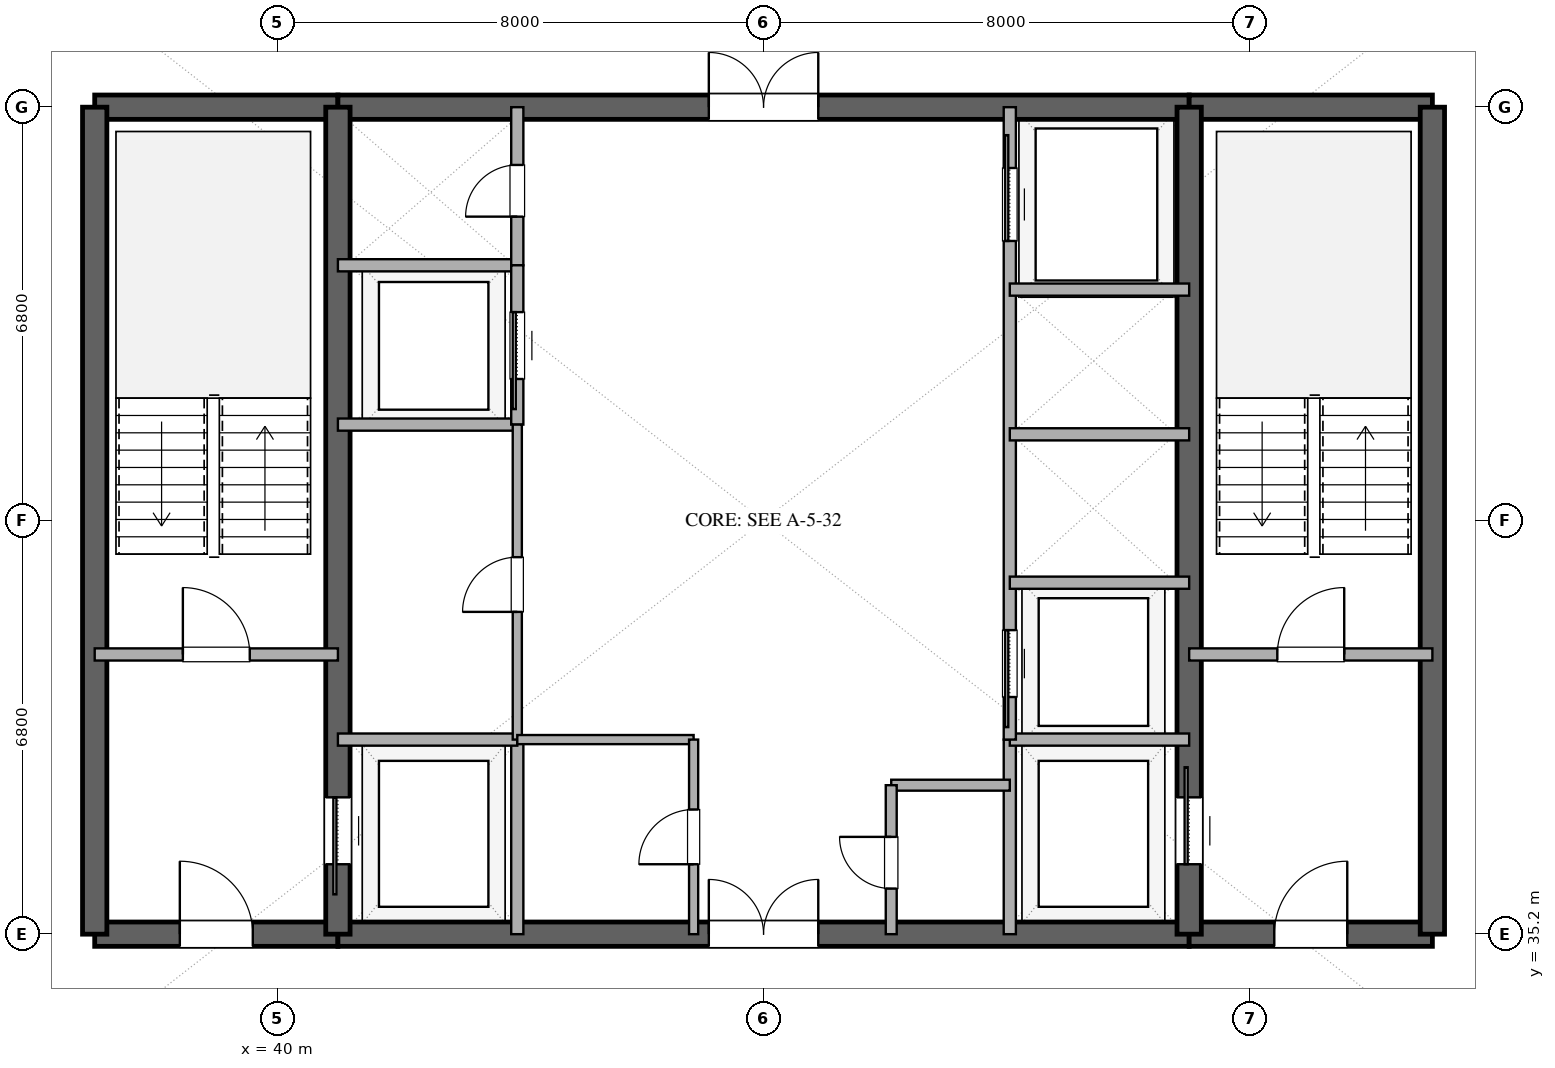
"""IFC4 building model, lengths in metres.
Left out: names, types, materials, properties, quantities, classifications, styles, units other than length and angle.
Written with IfcOpenShell. Run it as: python <this file> out.ifc"""

import sys

from ifc_helpers import new_model, si_unit, direction, frame, frame_2d, origin, place, context, subcontext, project, spatial, rectangle, extrude, element, fill, save


model = new_model("IFC4")
c1 = context("Model", 3, precision=1e-05, world=origin(), true_north=direction((0.0, 1.0)))
c2 = subcontext(c1, "Body", "Model", "MODEL_VIEW")
j1 = project(units=[si_unit("LENGTHUNIT", "METRE"), si_unit("PLANEANGLEUNIT", "RADIAN")], contexts=[c1])
p1 = place(None, origin())
s1 = spatial("IfcSite", under=j1, at=p1, CompositionType="ELEMENT")
p2 = place(p1, origin())
s2 = spatial("IfcBuilding", under=s1, at=p2, CompositionType="ELEMENT")
p3 = place(p2, frame((0.0, 0.0, 210.0)))
s3 = spatial("IfcBuildingStorey", under=s2, at=p3, CompositionType="ELEMENT", Elevation=210.0)
p4 = place(p3, frame((37.0, 35.2, 0.0), z_axis=(0.0, 0.0, 1.0), x_axis=(1.0, 0.0, 0.0)))
e1 = element("IfcWall", 1, at=p4, inside=s3, PredefinedType="SHEAR", context=c2, shape_type="SweptSolid", body=[
    extrude(rectangle(XDim=4.0, YDim=0.4, at=frame_2d((2.0, 0.0))), origin(), (0.0, 0.0, 1.0), 3.36),
])
p5 = place(p4, frame((1.4, 0.0, 0.0)))
e2 = element("IfcOpeningElement", 2, at=p5, cuts=e1, PredefinedType="OPENING", context=c2, shape_type="SweptSolid", body=[
    extrude(rectangle(XDim=1.2, YDim=2.15, at=frame_2d((0.6, 1.075))), frame((0.0, 0.21, 0.0), z_axis=(0.0, -1.0, 0.0), x_axis=(1.0, 0.0, 0.0)), (0.0, 0.0, 1.0), 0.42),
])
p6 = place(p3, frame((41.0, 35.2, 0.0), z_axis=(0.0, 0.0, 1.0), x_axis=(1.0, 0.0, 0.0)))
e3 = element("IfcWall", 3, at=p6, inside=s3, PredefinedType="SHEAR", context=c2, shape_type="SweptSolid", body=[
    extrude(rectangle(XDim=14.0, YDim=0.4, at=frame_2d((7.0, 0.0))), origin(), (0.0, 0.0, 1.0), 3.36),
])
p7 = place(p6, frame((6.1, 0.0, 0.0)))
e4 = element("IfcOpeningElement", 4, at=p7, cuts=e3, PredefinedType="OPENING", context=c2, shape_type="SweptSolid", body=[
    extrude(rectangle(XDim=1.8, YDim=2.25, at=frame_2d((0.9, 1.125))), frame((0.0, 0.21, 0.0), z_axis=(0.0, -1.0, 0.0), x_axis=(1.0, 0.0, 0.0)), (0.0, 0.0, 1.0), 0.42),
])
p8 = place(p3, frame((55.0, 35.2, 0.0), z_axis=(0.0, 0.0, 1.0), x_axis=(1.0, 0.0, 0.0)))
e5 = element("IfcWall", 5, at=p8, inside=s3, PredefinedType="SHEAR", context=c2, shape_type="SweptSolid", body=[
    extrude(rectangle(XDim=4.0, YDim=0.4, at=frame_2d((2.0, 0.0))), origin(), (0.0, 0.0, 1.0), 3.36),
])
p9 = place(p8, frame((1.4, 0.0, 0.0)))
e6 = element("IfcOpeningElement", 6, at=p9, cuts=e5, PredefinedType="OPENING", context=c2, shape_type="SweptSolid", body=[
    extrude(rectangle(XDim=1.2, YDim=2.15, at=frame_2d((0.6, 1.075))), frame((0.0, 0.21, 0.0), z_axis=(0.0, -1.0, 0.0), x_axis=(1.0, 0.0, 0.0)), (0.0, 0.0, 1.0), 0.42),
])
p10 = place(p3, frame((37.0, 48.8, 0.0), z_axis=(0.0, 0.0, 1.0), x_axis=(1.0, 0.0, 0.0)))
e7 = element("IfcWall", 7, at=p10, inside=s3, PredefinedType="SHEAR", context=c2, shape_type="SweptSolid", body=[
    extrude(rectangle(XDim=4.0, YDim=0.4, at=frame_2d((2.0, 0.0))), origin(), (0.0, 0.0, 1.0), 3.36),
])
p11 = place(p3, frame((41.0, 48.8, 0.0), z_axis=(0.0, 0.0, 1.0), x_axis=(1.0, 0.0, 0.0)))
e8 = element("IfcWall", 8, at=p11, inside=s3, PredefinedType="SHEAR", context=c2, shape_type="SweptSolid", body=[
    extrude(rectangle(XDim=14.0, YDim=0.4, at=frame_2d((7.0, 0.0))), origin(), (0.0, 0.0, 1.0), 3.36),
])
p12 = place(p11, frame((6.1, 0.0, 0.0)))
e9 = element("IfcOpeningElement", 9, at=p12, cuts=e8, PredefinedType="OPENING", context=c2, shape_type="SweptSolid", body=[
    extrude(rectangle(XDim=1.8, YDim=2.25, at=frame_2d((0.9, 1.125))), frame((0.0, 0.21, 0.0), z_axis=(0.0, -1.0, 0.0), x_axis=(1.0, 0.0, 0.0)), (0.0, 0.0, 1.0), 0.42),
])
p13 = place(p3, frame((55.0, 48.8, 0.0), z_axis=(0.0, 0.0, 1.0), x_axis=(1.0, 0.0, 0.0)))
e10 = element("IfcWall", 10, at=p13, inside=s3, PredefinedType="SHEAR", context=c2, shape_type="SweptSolid", body=[
    extrude(rectangle(XDim=4.0, YDim=0.4, at=frame_2d((2.0, 0.0))), origin(), (0.0, 0.0, 1.0), 3.36),
])
for number, where, z_axis, x_axis in (
    (11, (37.0, 35.2, 0.0), (0.0, 0.0, 1.0), (0.0, 1.0, 0.0)),
    (12, (59.0, 35.2, 0.0), (0.0, 0.0, 1.0), (0.0, 1.0, 0.0)),
):
    element("IfcWall", number, at=place(p3, frame(where, z_axis=z_axis, x_axis=x_axis)), inside=s3, PredefinedType="SHEAR", context=c2, shape_type="SweptSolid", body=[
        extrude(rectangle(XDim=13.6, YDim=0.4, at=frame_2d((6.8, 0.0))), origin(), (0.0, 0.0, 1.0), 3.36),
    ])
p14 = place(p3, frame((41.0, 35.2, 0.0), z_axis=(0.0, 0.0, 1.0), x_axis=(0.0, 1.0, 0.0)))
e13 = element("IfcWall", 13, at=p14, inside=s3, PredefinedType="SHEAR", context=c2, shape_type="SweptSolid", body=[
    extrude(rectangle(XDim=13.6, YDim=0.4, at=frame_2d((6.8, 0.0))), origin(), (0.0, 0.0, 1.0), 3.36),
])
p15 = place(p14, frame((1.15, 0.0, 0.0)))
e14 = element("IfcOpeningElement", 14, at=p15, cuts=e13, PredefinedType="OPENING", context=c2, shape_type="SweptSolid", body=[
    extrude(rectangle(XDim=1.1, YDim=2.2, at=frame_2d((0.55, 1.1))), frame((0.0, 0.21, 0.0), z_axis=(0.0, -1.0, 0.0), x_axis=(1.0, 0.0, 0.0)), (0.0, 0.0, 1.0), 0.42),
])
p16 = place(p3, frame((55.0, 35.2, 0.0), z_axis=(0.0, 0.0, 1.0), x_axis=(0.0, 1.0, 0.0)))
e15 = element("IfcWall", 15, at=p16, inside=s3, PredefinedType="SHEAR", context=c2, shape_type="SweptSolid", body=[
    extrude(rectangle(XDim=13.6, YDim=0.4, at=frame_2d((6.8, 0.0))), origin(), (0.0, 0.0, 1.0), 3.36),
])
p17 = place(p16, frame((1.15, 0.0, 0.0)))
e16 = element("IfcOpeningElement", 16, at=p17, cuts=e15, PredefinedType="OPENING", context=c2, shape_type="SweptSolid", body=[
    extrude(rectangle(XDim=1.1, YDim=2.2, at=frame_2d((0.55, 1.1))), frame((0.0, 0.21, 0.0), z_axis=(0.0, -1.0, 0.0), x_axis=(1.0, 0.0, 0.0)), (0.0, 0.0, 1.0), 0.42),
])
p18 = place(p3, frame((37.0, 39.8, 0.0), z_axis=(0.0, 0.0, 1.0), x_axis=(1.0, 0.0, 0.0)))
e17 = element("IfcWall", 17, at=p18, inside=s3, PredefinedType="SOLIDWALL", context=c2, shape_type="SweptSolid", body=[
    extrude(rectangle(XDim=4.0, YDim=0.2, at=frame_2d((2.0, 0.0))), origin(), (0.0, 0.0, 1.0), 2.72),
])
p19 = place(p18, frame((1.45, 0.0, 0.0)))
e18 = element("IfcOpeningElement", 18, at=p19, cuts=e17, PredefinedType="OPENING", context=c2, shape_type="SweptSolid", body=[
    extrude(rectangle(XDim=1.1, YDim=2.15, at=frame_2d((0.55, 1.075))), frame((0.0, 0.11, 0.0), z_axis=(0.0, -1.0, 0.0), x_axis=(1.0, 0.0, 0.0)), (0.0, 0.0, 1.0), 0.22),
])
p20 = place(p3, frame((55.0, 39.8, 0.0), z_axis=(0.0, 0.0, 1.0), x_axis=(1.0, 0.0, 0.0)))
e19 = element("IfcWall", 19, at=p20, inside=s3, PredefinedType="SOLIDWALL", context=c2, shape_type="SweptSolid", body=[
    extrude(rectangle(XDim=4.0, YDim=0.2, at=frame_2d((2.0, 0.0))), origin(), (0.0, 0.0, 1.0), 2.72),
])
p21 = place(p20, frame((1.45, 0.0, 0.0)))
e20 = element("IfcOpeningElement", 20, at=p21, cuts=e19, PredefinedType="OPENING", context=c2, shape_type="SweptSolid", body=[
    extrude(rectangle(XDim=1.1, YDim=2.15, at=frame_2d((0.55, 1.075))), frame((0.0, 0.11, 0.0), z_axis=(0.0, -1.0, 0.0), x_axis=(1.0, 0.0, 0.0)), (0.0, 0.0, 1.0), 0.22),
])
p22 = place(p3, frame((43.95, 35.2, 0.0), z_axis=(0.0, 0.0, 1.0), x_axis=(0.0, 1.0, 0.0)))
e21 = element("IfcWall", 21, at=p22, inside=s3, PredefinedType="SOLIDWALL", context=c2, shape_type="SweptSolid", body=[
    extrude(rectangle(XDim=3.2, YDim=0.2, at=frame_2d((1.6, 0.0))), origin(), (0.0, 0.0, 1.0), 2.72),
])
p23 = place(p3, frame((41.0, 38.4, 0.0), z_axis=(0.0, 0.0, 1.0), x_axis=(1.0, 0.0, 0.0)))
e22 = element("IfcWall", 22, at=p23, inside=s3, PredefinedType="SOLIDWALL", context=c2, shape_type="SweptSolid", body=[
    extrude(rectangle(XDim=2.95, YDim=0.2, at=frame_2d((1.475, 0.0))), origin(), (0.0, 0.0, 1.0), 2.72),
])
p24 = place(p3, frame((52.05, 35.2, 0.0), z_axis=(0.0, 0.0, 1.0), x_axis=(0.0, 1.0, 0.0)))
e23 = element("IfcWall", 23, at=p24, inside=s3, PredefinedType="SOLIDWALL", context=c2, shape_type="SweptSolid", body=[
    extrude(rectangle(XDim=3.2, YDim=0.2, at=frame_2d((1.6, 0.0))), origin(), (0.0, 0.0, 1.0), 2.72),
])
for number, where, z_axis, x_axis in (
    (24, (52.05, 38.4, 0.0), (0.0, 0.0, 1.0), (1.0, 0.0, 0.0)),
    (25, (41.0, 46.2, 0.0), (0.0, 0.0, 1.0), (1.0, 0.0, 0.0)),
):
    element("IfcWall", number, at=place(p3, frame(where, z_axis=z_axis, x_axis=x_axis)), inside=s3, PredefinedType="SOLIDWALL", context=c2, shape_type="SweptSolid", body=[
        extrude(rectangle(XDim=2.95, YDim=0.2, at=frame_2d((1.475, 0.0))), origin(), (0.0, 0.0, 1.0), 2.72),
    ])
p25 = place(p3, frame((43.95, 46.2, 0.0), z_axis=(0.0, 0.0, 1.0), x_axis=(0.0, 1.0, 0.0)))
e26 = element("IfcWall", 26, at=p25, inside=s3, PredefinedType="SOLIDWALL", context=c2, shape_type="SweptSolid", body=[
    extrude(rectangle(XDim=2.6, YDim=0.2, at=frame_2d((1.3, 0.0))), origin(), (0.0, 0.0, 1.0), 2.72),
])
p26 = place(p25, frame((0.8, 0.0, 0.0)))
e27 = element("IfcOpeningElement", 27, at=p26, cuts=e26, PredefinedType="OPENING", context=c2, shape_type="SweptSolid", body=[
    extrude(rectangle(XDim=0.85, YDim=2.15, at=frame_2d((0.425, 1.075))), frame((0.0, 0.11, 0.0), z_axis=(0.0, -1.0, 0.0), x_axis=(1.0, 0.0, 0.0)), (0.0, 0.0, 1.0), 0.22),
])
p27 = place(p3, frame((41.0, 43.58, 0.0), z_axis=(0.0, 0.0, 1.0), x_axis=(1.0, 0.0, 0.0)))
e28 = element("IfcWall", 28, at=p27, inside=s3, PredefinedType="SOLIDWALL", context=c2, shape_type="SweptSolid", body=[
    extrude(rectangle(XDim=2.95, YDim=0.2, at=frame_2d((1.475, 0.0))), origin(), (0.0, 0.0, 1.0), 2.72),
])
p28 = place(p3, frame((43.95, 43.58, 0.0), z_axis=(0.0, 0.0, 1.0), x_axis=(0.0, 1.0, 0.0)))
e29 = element("IfcWall", 29, at=p28, inside=s3, PredefinedType="SOLIDWALL", context=c2, shape_type="SweptSolid", body=[
    extrude(rectangle(XDim=2.62, YDim=0.2, at=frame_2d((1.31, 0.0))), origin(), (0.0, 0.0, 1.0), 2.72),
])
p29 = place(p28, frame((0.75, 0.0, 0.0)))
e30 = element("IfcOpeningElement", 30, at=p29, cuts=e29, PredefinedType="OPENING", context=c2, shape_type="SweptSolid", body=[
    extrude(rectangle(XDim=1.1, YDim=2.2, at=frame_2d((0.55, 1.1))), frame((0.0, 0.11, 0.0), z_axis=(0.0, -1.0, 0.0), x_axis=(1.0, 0.0, 0.0)), (0.0, 0.0, 1.0), 0.22),
])
p30 = place(p3, frame((43.95, 38.4, 0.0), z_axis=(0.0, 0.0, 1.0), x_axis=(0.0, 1.0, 0.0)))
e31 = element("IfcWall", 31, at=p30, inside=s3, PredefinedType="PARTITIONING", context=c2, shape_type="SweptSolid", body=[
    extrude(rectangle(XDim=5.18, YDim=0.15, at=frame_2d((2.59, 0.0))), origin(), (0.0, 0.0, 1.0), 2.72),
])
p31 = place(p30, frame((2.1, 0.0, 0.0)))
e32 = element("IfcOpeningElement", 32, at=p31, cuts=e31, PredefinedType="OPENING", context=c2, shape_type="SweptSolid", body=[
    extrude(rectangle(XDim=0.9, YDim=2.15, at=frame_2d((0.45, 1.075))), frame((0.0, 0.085, 0.0), z_axis=(0.0, -1.0, 0.0), x_axis=(1.0, 0.0, 0.0)), (0.0, 0.0, 1.0), 0.17),
])
p32 = place(p3, frame((52.05, 38.4, 0.0), z_axis=(0.0, 0.0, 1.0), x_axis=(0.0, 1.0, 0.0)))
e33 = element("IfcWall", 33, at=p32, inside=s3, PredefinedType="SOLIDWALL", context=c2, shape_type="SweptSolid", body=[
    extrude(rectangle(XDim=10.4, YDim=0.2, at=frame_2d((5.2, 0.0))), origin(), (0.0, 0.0, 1.0), 2.72),
])
p33 = place(p32, frame((0.7, 0.0, 0.0)))
e34 = element("IfcOpeningElement", 34, at=p33, cuts=e33, PredefinedType="OPENING", context=c2, shape_type="SweptSolid", body=[
    extrude(rectangle(XDim=1.1, YDim=2.2, at=frame_2d((0.55, 1.1))), frame((0.0, 0.11, 0.0), z_axis=(0.0, -1.0, 0.0), x_axis=(1.0, 0.0, 0.0)), (0.0, 0.0, 1.0), 0.22),
])
p34 = place(p32, frame((8.2, 0.0, 0.0)))
e35 = element("IfcOpeningElement", 35, at=p34, cuts=e33, PredefinedType="OPENING", context=c2, shape_type="SweptSolid", body=[
    extrude(rectangle(XDim=1.2, YDim=2.2, at=frame_2d((0.6, 1.1))), frame((0.0, 0.11, 0.0), z_axis=(0.0, -1.0, 0.0), x_axis=(1.0, 0.0, 0.0)), (0.0, 0.0, 1.0), 0.22),
])
for number, where, z_axis, x_axis in (
    (36, (52.05, 40.98, 0.0), (0.0, 0.0, 1.0), (1.0, 0.0, 0.0)),
    (37, (52.05, 43.42, 0.0), (0.0, 0.0, 1.0), (1.0, 0.0, 0.0)),
    (38, (52.05, 45.8, 0.0), (0.0, 0.0, 1.0), (1.0, 0.0, 0.0)),
):
    element("IfcWall", number, at=place(p3, frame(where, z_axis=z_axis, x_axis=x_axis)), inside=s3, PredefinedType="SOLIDWALL", context=c2, shape_type="SweptSolid", body=[
        extrude(rectangle(XDim=2.95, YDim=0.2, at=frame_2d((1.475, 0.0))), origin(), (0.0, 0.0, 1.0), 2.72),
    ])
p35 = place(p3, frame((43.95, 38.4, 0.0), z_axis=(0.0, 0.0, 1.0), x_axis=(1.0, 0.0, 0.0)))
e39 = element("IfcWall", 39, at=p35, inside=s3, PredefinedType="PARTITIONING", context=c2, shape_type="SweptSolid", body=[
    extrude(rectangle(XDim=2.9, YDim=0.15, at=frame_2d((1.45, 0.0))), origin(), (0.0, 0.0, 1.0), 2.72),
])
p36 = place(p3, frame((46.85, 35.2, 0.0), z_axis=(0.0, 0.0, 1.0), x_axis=(0.0, 1.0, 0.0)))
e40 = element("IfcWall", 40, at=p36, inside=s3, PredefinedType="PARTITIONING", context=c2, shape_type="SweptSolid", body=[
    extrude(rectangle(XDim=3.2, YDim=0.15, at=frame_2d((1.6, 0.0))), origin(), (0.0, 0.0, 1.0), 2.72),
])
p37 = place(p36, frame((1.15, 0.0, 0.0)))
e41 = element("IfcOpeningElement", 41, at=p37, cuts=e40, PredefinedType="OPENING", context=c2, shape_type="SweptSolid", body=[
    extrude(rectangle(XDim=0.9, YDim=2.15, at=frame_2d((0.45, 1.075))), frame((0.0, 0.085, 0.0), z_axis=(0.0, -1.0, 0.0), x_axis=(1.0, 0.0, 0.0)), (0.0, 0.0, 1.0), 0.17),
])
p38 = place(p3, frame((50.1, 37.65, 0.0), z_axis=(0.0, 0.0, 1.0), x_axis=(1.0, 0.0, 0.0)))
e42 = element("IfcWall", 42, at=p38, inside=s3, PredefinedType="PLUMBINGWALL", context=c2, shape_type="SweptSolid", body=[
    extrude(rectangle(XDim=1.95, YDim=0.18, at=frame_2d((0.975, 0.0))), origin(), (0.0, 0.0, 1.0), 2.72),
])
p39 = place(p3, frame((50.1, 35.2, 0.0), z_axis=(0.0, 0.0, 1.0), x_axis=(0.0, 1.0, 0.0)))
e43 = element("IfcWall", 43, at=p39, inside=s3, PredefinedType="PLUMBINGWALL", context=c2, shape_type="SweptSolid", body=[
    extrude(rectangle(XDim=2.45, YDim=0.18, at=frame_2d((1.225, 0.0))), origin(), (0.0, 0.0, 1.0), 2.72),
])
p40 = place(p39, frame((0.75, 0.0, 0.0)))
e44 = element("IfcOpeningElement", 44, at=p40, cuts=e43, PredefinedType="OPENING", context=c2, shape_type="SweptSolid", body=[
    extrude(rectangle(XDim=0.85, YDim=2.1, at=frame_2d((0.425, 1.05))), frame((0.0, 0.1, 0.0), z_axis=(0.0, -1.0, 0.0), x_axis=(1.0, 0.0, 0.0)), (0.0, 0.0, 1.0), 0.2),
])
p41 = place(p15, origin())
e45 = element("IfcDoor", 45, at=p41, inside=s3, OperationType="SLIDING_TO_LEFT", PredefinedType="DOOR", context=c2, shape_type="SweptSolid", body=[
    extrude(rectangle(XDim=1.1, YDim=2.2, at=frame_2d((0.55, 1.1))), frame((0.0, 0.025, 0.0), z_axis=(0.0, -1.0, 0.0), x_axis=(1.0, 0.0, 0.0)), (0.0, 0.0, 1.0), 0.05),
])
fill(e14, e45)
p42 = place(p17, origin())
e46 = element("IfcDoor", 46, at=p42, inside=s3, OperationType="SLIDING_TO_RIGHT", PredefinedType="DOOR", context=c2, shape_type="SweptSolid", body=[
    extrude(rectangle(XDim=1.1, YDim=2.2, at=frame_2d((0.55, 1.1))), frame((0.0, 0.025, 0.0), z_axis=(0.0, -1.0, 0.0), x_axis=(1.0, 0.0, 0.0)), (0.0, 0.0, 1.0), 0.05),
])
fill(e16, e46)
p43 = place(p5, origin())
e47 = element("IfcDoor", 47, at=p43, inside=s3, OperationType="SINGLE_SWING_LEFT", PredefinedType="DOOR", context=c2, shape_type="SweptSolid", body=[
    extrude(rectangle(XDim=1.2, YDim=2.15, at=frame_2d((0.6, 1.075))), frame((0.0, 0.025, 0.0), z_axis=(0.0, -1.0, 0.0), x_axis=(1.0, 0.0, 0.0)), (0.0, 0.0, 1.0), 0.05),
])
fill(e2, e47)
p44 = place(p9, origin())
e48 = element("IfcDoor", 48, at=p44, inside=s3, OperationType="SINGLE_SWING_RIGHT", PredefinedType="DOOR", context=c2, shape_type="SweptSolid", body=[
    extrude(rectangle(XDim=1.2, YDim=2.15, at=frame_2d((0.6, 1.075))), frame((0.0, 0.025, 0.0), z_axis=(0.0, -1.0, 0.0), x_axis=(1.0, 0.0, 0.0)), (0.0, 0.0, 1.0), 0.05),
])
fill(e6, e48)
p45 = place(p7, origin())
e49 = element("IfcDoor", 49, at=p45, inside=s3, OperationType="DOUBLE_DOOR_SINGLE_SWING", PredefinedType="DOOR", context=c2, shape_type="SweptSolid", body=[
    extrude(rectangle(XDim=1.8, YDim=2.25, at=frame_2d((0.9, 1.125))), frame((0.0, 0.025, 0.0), z_axis=(0.0, -1.0, 0.0), x_axis=(1.0, 0.0, 0.0)), (0.0, 0.0, 1.0), 0.05),
])
fill(e4, e49)
p46 = place(p12, origin())
e50 = element("IfcDoor", 50, at=p46, inside=s3, OperationType="DOUBLE_DOOR_SINGLE_SWING", PredefinedType="DOOR", context=c2, shape_type="SweptSolid", body=[
    extrude(rectangle(XDim=1.8, YDim=2.25, at=frame_2d((0.9, 1.125))), frame((0.0, 0.025, 0.0), z_axis=(0.0, -1.0, 0.0), x_axis=(1.0, 0.0, 0.0)), (0.0, 0.0, 1.0), 0.05),
])
fill(e9, e50)
p47 = place(p19, origin())
e51 = element("IfcDoor", 51, at=p47, inside=s3, OperationType="SINGLE_SWING_LEFT", PredefinedType="DOOR", context=c2, shape_type="SweptSolid", body=[
    extrude(rectangle(XDim=1.1, YDim=2.15, at=frame_2d((0.55, 1.075))), frame((0.0, 0.025, 0.0), z_axis=(0.0, -1.0, 0.0), x_axis=(1.0, 0.0, 0.0)), (0.0, 0.0, 1.0), 0.05),
])
fill(e18, e51)
p48 = place(p21, origin())
e52 = element("IfcDoor", 52, at=p48, inside=s3, OperationType="SINGLE_SWING_RIGHT", PredefinedType="DOOR", context=c2, shape_type="SweptSolid", body=[
    extrude(rectangle(XDim=1.1, YDim=2.15, at=frame_2d((0.55, 1.075))), frame((0.0, 0.025, 0.0), z_axis=(0.0, -1.0, 0.0), x_axis=(1.0, 0.0, 0.0)), (0.0, 0.0, 1.0), 0.05),
])
fill(e20, e52)
p49 = place(p26, origin())
e53 = element("IfcDoor", 53, at=p49, inside=s3, OperationType="SINGLE_SWING_LEFT", PredefinedType="DOOR", context=c2, shape_type="SweptSolid", body=[
    extrude(rectangle(XDim=0.85, YDim=2.15, at=frame_2d((0.425, 1.075))), frame((0.0, 0.025, 0.0), z_axis=(0.0, -1.0, 0.0), x_axis=(1.0, 0.0, 0.0)), (0.0, 0.0, 1.0), 0.05),
])
fill(e27, e53)
p50 = place(p29, origin())
e54 = element("IfcDoor", 54, at=p50, inside=s3, OperationType="SLIDING_TO_LEFT", PredefinedType="DOOR", context=c2, shape_type="SweptSolid", body=[
    extrude(rectangle(XDim=1.1, YDim=2.2, at=frame_2d((0.55, 1.1))), frame((0.0, 0.025, 0.0), z_axis=(0.0, -1.0, 0.0), x_axis=(1.0, 0.0, 0.0)), (0.0, 0.0, 1.0), 0.05),
])
fill(e30, e54)
p51 = place(p31, origin())
e55 = element("IfcDoor", 55, at=p51, inside=s3, OperationType="SINGLE_SWING_LEFT", PredefinedType="DOOR", context=c2, shape_type="SweptSolid", body=[
    extrude(rectangle(XDim=0.9, YDim=2.15, at=frame_2d((0.45, 1.075))), frame((0.0, 0.025, 0.0), z_axis=(0.0, -1.0, 0.0), x_axis=(1.0, 0.0, 0.0)), (0.0, 0.0, 1.0), 0.05),
])
fill(e32, e55)
p52 = place(p33, origin())
e56 = element("IfcDoor", 56, at=p52, inside=s3, OperationType="SLIDING_TO_LEFT", PredefinedType="DOOR", context=c2, shape_type="SweptSolid", body=[
    extrude(rectangle(XDim=1.1, YDim=2.2, at=frame_2d((0.55, 1.1))), frame((0.0, 0.025, 0.0), z_axis=(0.0, -1.0, 0.0), x_axis=(1.0, 0.0, 0.0)), (0.0, 0.0, 1.0), 0.05),
])
fill(e34, e56)
p53 = place(p34, origin())
e57 = element("IfcDoor", 57, at=p53, inside=s3, OperationType="SLIDING_TO_RIGHT", PredefinedType="DOOR", context=c2, shape_type="SweptSolid", body=[
    extrude(rectangle(XDim=1.2, YDim=2.2, at=frame_2d((0.6, 1.1))), frame((0.0, 0.025, 0.0), z_axis=(0.0, -1.0, 0.0), x_axis=(1.0, 0.0, 0.0)), (0.0, 0.0, 1.0), 0.05),
])
fill(e35, e57)
p54 = place(p37, origin())
e58 = element("IfcDoor", 58, at=p54, inside=s3, OperationType="SINGLE_SWING_LEFT", PredefinedType="DOOR", context=c2, shape_type="SweptSolid", body=[
    extrude(rectangle(XDim=0.9, YDim=2.15, at=frame_2d((0.45, 1.075))), frame((0.0, 0.025, 0.0), z_axis=(0.0, -1.0, 0.0), x_axis=(1.0, 0.0, 0.0)), (0.0, 0.0, 1.0), 0.05),
])
fill(e41, e58)
p55 = place(p40, origin())
e59 = element("IfcDoor", 59, at=p55, inside=s3, OperationType="SINGLE_SWING_RIGHT", PredefinedType="DOOR", context=c2, shape_type="SweptSolid", body=[
    extrude(rectangle(XDim=0.85, YDim=2.1, at=frame_2d((0.425, 1.05))), frame((0.0, 0.025, 0.0), z_axis=(0.0, -1.0, 0.0), x_axis=(1.0, 0.0, 0.0)), (0.0, 0.0, 1.0), 0.05),
])
fill(e44, e59)
save(model, sys.argv[1])
